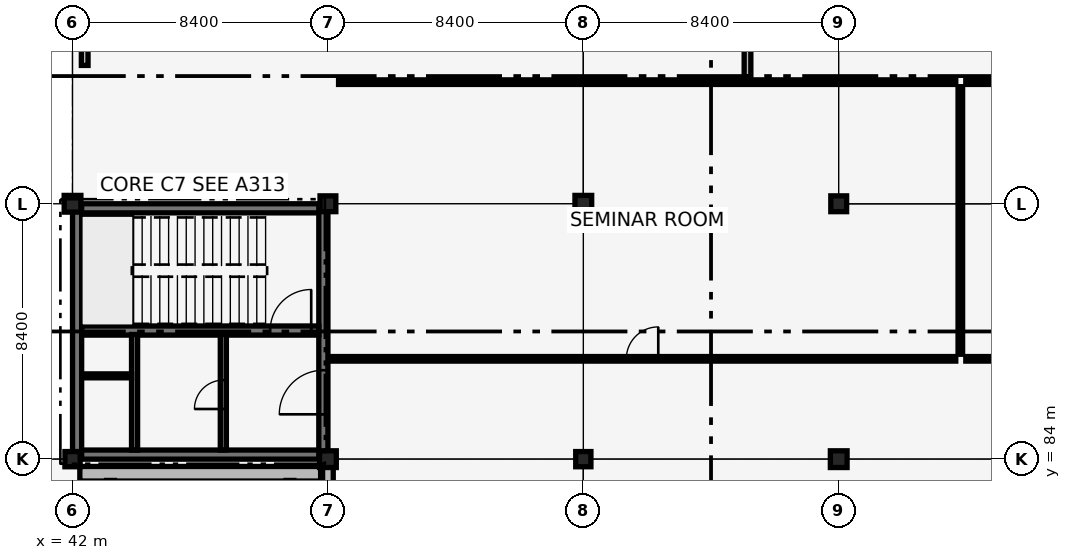
"""IFC4 building model, lengths in metres.
Left out: names, types, materials, properties, quantities, classifications, styles, units other than length and angle.
Written with IfcOpenShell. Run it as: python <this file> out.ifc"""

import sys

from ifc_helpers import new_model, si_unit, direction, frame, frame_2d, origin, origin_2d, place, context, subcontext, project, spatial, polyline, rectangle, outline, extrude, element, fill, save


model = new_model("IFC4")
c1 = context("Model", 3, precision=1e-05, world=origin(), true_north=direction((0.0, 1.0)))
c2 = subcontext(c1, "Body", "Model", "MODEL_VIEW")
j1 = project(units=[si_unit("LENGTHUNIT", "METRE"), si_unit("PLANEANGLEUNIT", "RADIAN")], contexts=[c1])
p1 = place(None, origin())
s1 = spatial("IfcSite", under=j1, at=p1, CompositionType="ELEMENT")
p2 = place(p1, origin())
s2 = spatial("IfcBuilding", under=s1, at=p2, CompositionType="ELEMENT")
p3 = place(p2, origin())
s3 = spatial("IfcBuildingStorey", under=s2, at=p3, CompositionType="ELEMENT", Elevation=0.0)
for number, where, z_axis, x_axis in (
    (1, (42.15, 84.15, 0.0), (0.0, 0.0, 1.0), (1.0, 0.0, 0.0)),
    (2, (42.15, 92.25, 0.0), (0.0, 0.0, 1.0), (1.0, 0.0, 0.0)),
    (3, (42.15, 84.15, 0.0), (0.0, 0.0, 1.0), (0.0, 1.0, 0.0)),
):
    element("IfcWall", number, at=place(p3, frame(where, z_axis=z_axis, x_axis=x_axis)), inside=s3, PredefinedType="SHEAR", context=c2, shape_type="SweptSolid", body=[
        extrude(rectangle(XDim=8.1, YDim=0.3, at=frame_2d((4.05, 0.0))), origin(), (0.0, 0.0, 1.0), 5.14),
    ])
p4 = place(p3, frame((50.25, 84.15, 0.0), z_axis=(0.0, 0.0, 1.0), x_axis=(0.0, 1.0, 0.0)))
e4 = element("IfcWall", 4, at=p4, inside=s3, PredefinedType="SHEAR", context=c2, shape_type="SweptSolid", body=[
    extrude(rectangle(XDim=8.1, YDim=0.3, at=frame_2d((4.05, 0.0))), origin(), (0.0, 0.0, 1.0), 5.14),
])
p5 = place(p4, frame((1.325, 0.0, 0.0)))
e5 = element("IfcOpeningElement", 5, at=p5, cuts=e4, PredefinedType="OPENING", context=c2, shape_type="SweptSolid", body=[
    extrude(rectangle(XDim=1.45, YDim=2.15, at=frame_2d((0.725, 1.075))), frame((0.0, 0.16, 0.0), z_axis=(0.0, -1.0, 0.0), x_axis=(1.0, 0.0, 0.0)), (0.0, 0.0, 1.0), 0.32),
])
p6 = place(p3, frame((42.3, 88.23, 0.0), z_axis=(0.0, 0.0, 1.0), x_axis=(1.0, 0.0, 0.0)))
e6 = element("IfcWall", 6, at=p6, inside=s3, PredefinedType="SHEAR", context=c2, shape_type="SweptSolid", body=[
    extrude(rectangle(XDim=7.8, YDim=0.3, at=frame_2d((3.9, 0.0))), origin(), (0.0, 0.0, 1.0), 5.14),
])
p7 = place(p6, frame((6.2, 0.0, 0.0)))
e7 = element("IfcOpeningElement", 7, at=p7, cuts=e6, PredefinedType="OPENING", context=c2, shape_type="SweptSolid", body=[
    extrude(rectangle(XDim=1.35, YDim=2.15, at=frame_2d((0.675, 1.075))), frame((0.0, 0.16, 0.0), z_axis=(0.0, -1.0, 0.0), x_axis=(1.0, 0.0, 0.0)), (0.0, 0.0, 1.0), 0.32),
])
p8 = place(p3, frame((42.0, 84.0, -0.32), z_axis=(0.0, 0.0, 1.0), x_axis=(1.0, 0.0, 0.0)))
e8 = element("IfcColumn", 8, at=p8, inside=s3, PredefinedType="COLUMN", context=c2, shape_type="SweptSolid", body=[
    extrude(rectangle(XDim=0.5, YDim=0.5, at=origin_2d()), origin(), (0.0, 0.0, 1.0), 5.46),
])
for number, where, z_axis, x_axis in (
    (9, (42.0, 92.4, -0.32), (0.0, 0.0, 1.0), (1.0, 0.0, 0.0)),
    (10, (50.4, 84.0, -0.32), (0.0, 0.0, 1.0), (1.0, 0.0, 0.0)),
):
    element("IfcColumn", number, at=place(p3, frame(where, z_axis=z_axis, x_axis=x_axis)), inside=s3, PredefinedType="COLUMN", context=c2, shape_type="SweptSolid", body=[
        extrude(rectangle(XDim=0.55, YDim=0.55, at=origin_2d()), origin(), (0.0, 0.0, 1.0), 5.46),
    ])
p9 = place(p3, frame((50.4, 92.4, -0.32), z_axis=(0.0, 0.0, 1.0), x_axis=(1.0, 0.0, 0.0)))
e11 = element("IfcColumn", 11, at=p9, inside=s3, PredefinedType="COLUMN", context=c2, shape_type="SweptSolid", body=[
    extrude(rectangle(XDim=0.52, YDim=0.52, at=origin_2d()), origin(), (0.0, 0.0, 1.0), 5.46),
])
p10 = place(p3, frame((58.8, 84.0, -0.32), z_axis=(0.0, 0.0, 1.0), x_axis=(1.0, 0.0, 0.0)))
e12 = element("IfcColumn", 12, at=p10, inside=s3, PredefinedType="COLUMN", context=c2, shape_type="SweptSolid", body=[
    extrude(rectangle(XDim=0.5, YDim=0.5, at=origin_2d()), origin(), (0.0, 0.0, 1.0), 5.46),
])
for number, where, z_axis, x_axis in (
    (13, (58.8, 92.4, -0.32), (0.0, 0.0, 1.0), (1.0, 0.0, 0.0)),
    (14, (67.2, 84.0, -0.32), (0.0, 0.0, 1.0), (1.0, 0.0, 0.0)),
):
    element("IfcColumn", number, at=place(p3, frame(where, z_axis=z_axis, x_axis=x_axis)), inside=s3, PredefinedType="COLUMN", context=c2, shape_type="SweptSolid", body=[
        extrude(rectangle(XDim=0.55, YDim=0.55, at=origin_2d()), origin(), (0.0, 0.0, 1.0), 5.46),
    ])
p11 = place(p3, frame((67.2, 92.4, -0.32), z_axis=(0.0, 0.0, 1.0), x_axis=(1.0, 0.0, 0.0)))
e15 = element("IfcColumn", 15, at=p11, inside=s3, PredefinedType="COLUMN", context=c2, shape_type="SweptSolid", body=[
    extrude(rectangle(XDim=0.52, YDim=0.52, at=origin_2d()), origin(), (0.0, 0.0, 1.0), 5.46),
])
p12 = place(p3, frame((50.4, 75.6, 5.145), z_axis=(0.0, 0.0, 1.0), x_axis=(0.0, 1.0, 0.0)))
e16 = element("IfcWall", 16, at=p12, inside=s3, PredefinedType="SOLIDWALL", context=c2, shape_type="SweptSolid", body=[
    extrude(outline(polyline([(0.0, 0.0), (8.4, 0.0), (8.4, 0.25), (4.2, 2.489), (0.0, 0.25), (0.0, 0.0)])), frame((0.0, 0.175, 0.0), z_axis=(0.0, -1.0, 0.0), x_axis=(1.0, 0.0, 0.0)), (0.0, 0.0, 1.0), 0.35),
])
p13 = place(p3, frame((42.24, 83.52, -0.25), z_axis=(0.0, 0.0, 1.0), x_axis=(1.0, 0.0, 0.0)))
e17 = element("IfcWall", 17, at=p13, inside=s3, PredefinedType="SOLIDWALL", context=c2, shape_type="SweptSolid", body=[
    extrude(rectangle(XDim=7.92, YDim=0.48, at=frame_2d((3.96, 0.0))), origin(), (0.0, 0.0, 1.0), 5.69),
])
p14 = place(p3, frame((46.96, 84.3, 0.0), z_axis=(0.0, 0.0, 1.0), x_axis=(0.0, 1.0, 0.0)))
e18 = element("IfcWall", 18, at=p14, inside=s3, PredefinedType="SHEAR", context=c2, shape_type="SweptSolid", body=[
    extrude(rectangle(XDim=3.8, YDim=0.2, at=frame_2d((1.9, 0.0))), origin(), (0.0, 0.0, 1.0), 4.4),
])
p15 = place(p14, frame((1.35, 0.0, 0.0)))
e19 = element("IfcOpeningElement", 19, at=p15, cuts=e18, PredefinedType="OPENING", context=c2, shape_type="SweptSolid", body=[
    extrude(rectangle(XDim=0.95, YDim=2.1, at=frame_2d((0.475, 1.05))), frame((0.0, 0.11, 0.0), z_axis=(0.0, -1.0, 0.0), x_axis=(1.0, 0.0, 0.0)), (0.0, 0.0, 1.0), 0.22),
])
p16 = place(p3, frame((44.04, 84.3, 0.0), z_axis=(0.0, 0.0, 1.0), x_axis=(0.0, 1.0, 0.0)))
e20 = element("IfcWall", 20, at=p16, inside=s3, PredefinedType="SHEAR", context=c2, shape_type="SweptSolid", body=[
    extrude(rectangle(XDim=3.8, YDim=0.2, at=frame_2d((1.9, 0.0))), origin(), (0.0, 0.0, 1.0), 4.4),
])
p17 = place(p3, frame((42.32, 86.74, 0.0), z_axis=(0.0, 0.0, 1.0), x_axis=(1.0, 0.0, 0.0)))
e21 = element("IfcWall", 21, at=p17, inside=s3, PredefinedType="PARTITIONING", context=c2, shape_type="SweptSolid", body=[
    extrude(rectangle(XDim=1.62, YDim=0.13, at=frame_2d((0.81, 0.0))), origin(), (0.0, 0.0, 1.0), 4.39),
])
p18 = place(p3, frame((50.43, 87.3, 0.0), z_axis=(0.0, 0.0, 1.0), x_axis=(1.0, 0.0, 0.0)))
e22 = element("IfcWall", 22, at=p18, inside=s3, PredefinedType="PARTITIONING", context=c2, shape_type="SweptSolid", body=[
    extrude(rectangle(XDim=20.62, YDim=0.15, at=frame_2d((10.31, 0.0))), origin(), (0.0, 0.0, 1.0), 4.49),
])
p19 = place(p18, frame((9.785, 0.0, 0.0)))
e23 = element("IfcOpeningElement", 23, at=p19, cuts=e22, PredefinedType="OPENING", context=c2, shape_type="SweptSolid", body=[
    extrude(rectangle(XDim=1.05, YDim=2.15, at=frame_2d((0.525, 1.075))), frame((0.0, 0.085, 0.0), z_axis=(0.0, -1.0, 0.0), x_axis=(1.0, 0.0, 0.0)), (0.0, 0.0, 1.0), 0.17),
])
p20 = place(p3, frame((50.75, 96.4, 0.0), z_axis=(0.0, 0.0, 1.0), x_axis=(1.0, 0.0, 0.0)))
e24 = element("IfcWall", 24, at=p20, inside=s3, PredefinedType="PARTITIONING", context=c2, shape_type="SweptSolid", body=[
    extrude(rectangle(XDim=20.3, YDim=0.15, at=frame_2d((10.15, 0.0))), origin(), (0.0, 0.0, 1.0), 4.74),
])
p21 = place(p3, frame((71.2, 87.45, 0.0), z_axis=(0.0, 0.0, 1.0), x_axis=(0.0, 1.0, 0.0)))
e25 = element("IfcWall", 25, at=p21, inside=s3, PredefinedType="PARTITIONING", context=c2, shape_type="SweptSolid", body=[
    extrude(rectangle(XDim=8.8, YDim=0.15, at=frame_2d((4.4, 0.0))), origin(), (0.0, 0.0, 1.0), 4.46),
])
p22 = place(p3, frame((71.38, 87.3, 0.0), z_axis=(0.0, 0.0, 1.0), x_axis=(1.0, 0.0, 0.0)))
e26 = element("IfcWall", 26, at=p22, inside=s3, PredefinedType="PARTITIONING", context=c2, shape_type="SweptSolid", body=[
    extrude(rectangle(XDim=20.67, YDim=0.15, at=frame_2d((10.335, 0.0))), origin(), (0.0, 0.0, 1.0), 4.49),
])
p23 = place(p22, frame((9.81, 0.0, 0.0)))
e27 = element("IfcOpeningElement", 27, at=p23, cuts=e26, PredefinedType="OPENING", context=c2, shape_type="SweptSolid", body=[
    extrude(rectangle(XDim=1.05, YDim=2.15, at=frame_2d((0.525, 1.075))), frame((0.0, 0.085, 0.0), z_axis=(0.0, -1.0, 0.0), x_axis=(1.0, 0.0, 0.0)), (0.0, 0.0, 1.0), 0.17),
])
p24 = place(p3, frame((71.38, 96.4, 0.0), z_axis=(0.0, 0.0, 1.0), x_axis=(1.0, 0.0, 0.0)))
e28 = element("IfcWall", 28, at=p24, inside=s3, PredefinedType="PARTITIONING", context=c2, shape_type="SweptSolid", body=[
    extrude(rectangle(XDim=20.67, YDim=0.15, at=frame_2d((10.335, 0.0))), origin(), (0.0, 0.0, 1.0), 4.74),
])
p25 = place(p3, frame((42.4, 96.95, 0.0), z_axis=(0.0, 0.0, 1.0), x_axis=(0.0, 1.0, 0.0)))
e29 = element("IfcWall", 29, at=p25, inside=s3, PredefinedType="PARTITIONING", context=c2, shape_type="SweptSolid", body=[
    extrude(rectangle(XDim=3.54, YDim=0.22, at=frame_2d((1.77, 0.0))), origin(), (0.0, 0.0, 1.0), 3.74),
])
p26 = place(p3, frame((64.2, 96.58, 0.0), z_axis=(0.0, 0.0, 1.0), x_axis=(0.0, 1.0, 0.0)))
e30 = element("IfcWall", 30, at=p26, inside=s3, PredefinedType="PARTITIONING", context=c2, shape_type="SweptSolid", body=[
    extrude(rectangle(XDim=20.84, YDim=0.22, at=frame_2d((10.42, 0.0))), origin(), (0.0, 0.0, 1.0), 3.74),
])
p27 = place(p26, frame((9.57, 0.0, 0.0)))
e31 = element("IfcOpeningElement", 31, at=p27, cuts=e30, PredefinedType="OPENING", context=c2, shape_type="SweptSolid", body=[
    extrude(rectangle(XDim=1.7, YDim=2.25, at=frame_2d((0.85, 1.125))), frame((0.0, 0.12, 0.0), z_axis=(0.0, -1.0, 0.0), x_axis=(1.0, 0.0, 0.0)), (0.0, 0.0, 1.0), 0.24),
])
p28 = place(p7, origin())
e32 = element("IfcDoor", 32, at=p28, inside=s3, OperationType="SINGLE_SWING_RIGHT", PredefinedType="DOOR", context=c2, shape_type="SweptSolid", body=[
    extrude(rectangle(XDim=1.35, YDim=2.15, at=frame_2d((0.675, 1.075))), frame((0.0, 0.025, 0.0), z_axis=(0.0, -1.0, 0.0), x_axis=(1.0, 0.0, 0.0)), (0.0, 0.0, 1.0), 0.05),
])
fill(e7, e32)
p29 = place(p15, origin())
e33 = element("IfcDoor", 33, at=p29, inside=s3, OperationType="SINGLE_SWING_LEFT", PredefinedType="DOOR", context=c2, shape_type="SweptSolid", body=[
    extrude(rectangle(XDim=0.95, YDim=2.1, at=frame_2d((0.475, 1.05))), frame((0.0, 0.025, 0.0), z_axis=(0.0, -1.0, 0.0), x_axis=(1.0, 0.0, 0.0)), (0.0, 0.0, 1.0), 0.05),
])
fill(e19, e33)
p30 = place(p5, origin())
e34 = element("IfcDoor", 34, at=p30, inside=s3, OperationType="DOUBLE_DOOR_SINGLE_SWING", PredefinedType="DOOR", context=c2, shape_type="SweptSolid", body=[
    extrude(rectangle(XDim=1.45, YDim=2.15, at=frame_2d((0.725, 1.075))), frame((0.0, 0.025, 0.0), z_axis=(0.0, -1.0, 0.0), x_axis=(1.0, 0.0, 0.0)), (0.0, 0.0, 1.0), 0.05),
])
fill(e5, e34)
p31 = place(p19, origin())
e35 = element("IfcDoor", 35, at=p31, inside=s3, OperationType="SINGLE_SWING_RIGHT", PredefinedType="DOOR", context=c2, shape_type="SweptSolid", body=[
    extrude(rectangle(XDim=1.05, YDim=2.15, at=frame_2d((0.525, 1.075))), frame((0.0, 0.025, 0.0), z_axis=(0.0, -1.0, 0.0), x_axis=(1.0, 0.0, 0.0)), (0.0, 0.0, 1.0), 0.05),
])
fill(e23, e35)
save(model, sys.argv[1])
